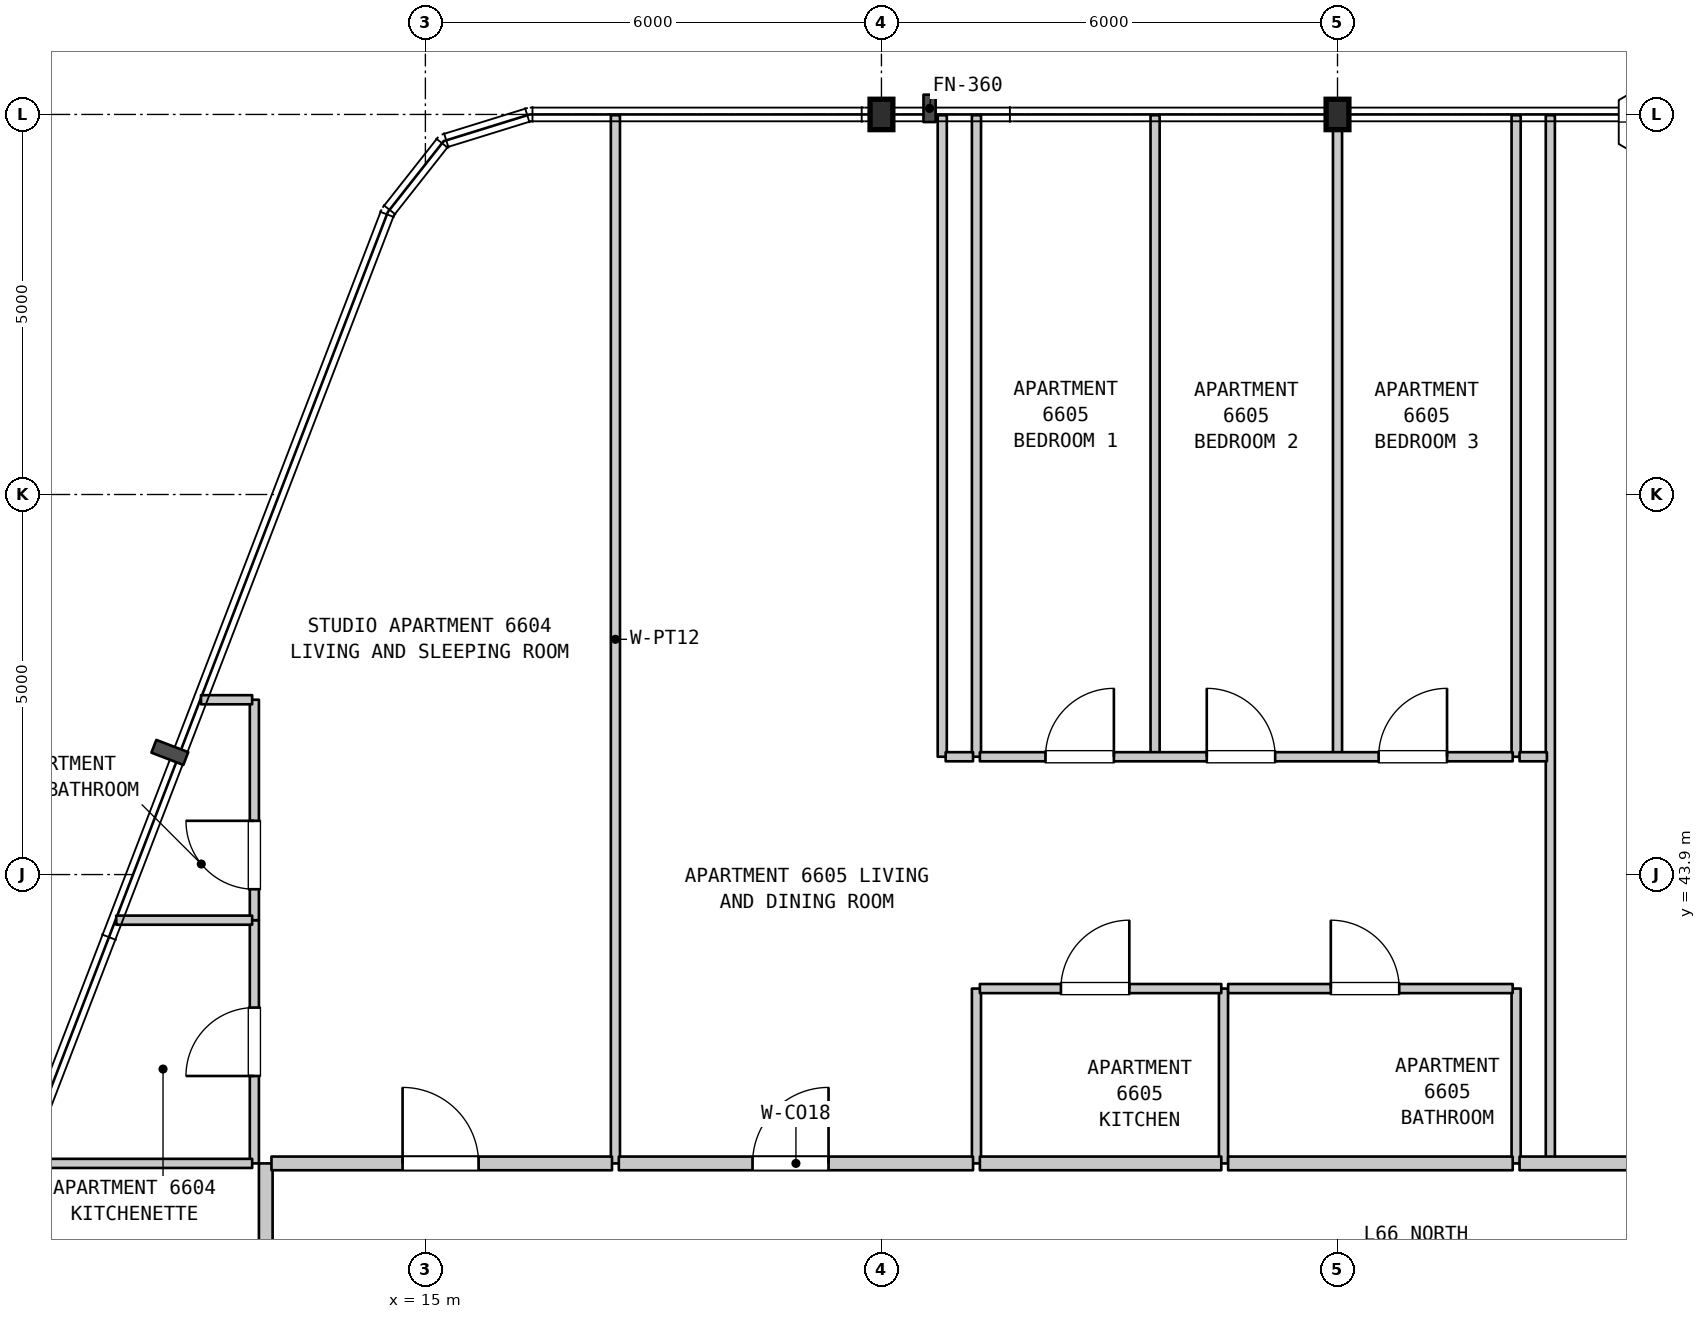
"""IFC4 building model, lengths in metres.
Left out: names, types, materials, properties, quantities, classifications, styles, units other than length and angle.
Written with IfcOpenShell. Run it as: python <this file> out.ifc"""

import sys

from ifc_helpers import new_model, si_unit, direction, frame, frame_2d, origin, origin_2d, place, context, subcontext, project, spatial, rectangle, i_section, extrude, element, fill, save


model = new_model("IFC4")
c1 = context("Model", 3, precision=1e-05, world=origin(), true_north=direction((0.0, 1.0)))
c2 = subcontext(c1, "Body", "Model", "MODEL_VIEW")
j1 = project(units=[si_unit("LENGTHUNIT", "METRE"), si_unit("PLANEANGLEUNIT", "RADIAN")], contexts=[c1])
p1 = place(None, origin())
s1 = spatial("IfcSite", under=j1, at=p1, CompositionType="ELEMENT")
p2 = place(p1, origin())
s2 = spatial("IfcBuilding", under=s1, at=p2, CompositionType="ELEMENT")
p3 = place(p2, frame((0.0, 0.0, 265.8)))
s3 = spatial("IfcBuildingStorey", under=s2, at=p3, CompositionType="ELEMENT", Elevation=265.8)
for number, where, z_axis, x_axis in (
    (1, (21.0, 53.9, 0.0), (0.0, 0.0, 1.0), (1.0, 0.0, 0.0)),
    (2, (27.0, 53.9, 0.0), (0.0, 0.0, 1.0), (1.0, 0.0, 0.0)),
):
    element("IfcColumn", number, at=place(p3, frame(where, z_axis=z_axis, x_axis=x_axis)), inside=s3, PredefinedType="COLUMN", context=c2, shape_type="SweptSolid", body=[
        extrude(i_section(OverallWidth=0.3, OverallDepth=0.4, WebThickness=0.013, FlangeThickness=0.024, FilletRadius=0.027, at=origin_2d()), origin(), (0.0, 0.0, 1.0), 3.7),
    ])
p4 = place(p3, frame((12.75, 40.1, 0.0), z_axis=(0.0, 0.0, 1.0), x_axis=(0.0, 1.0, 0.0)))
e3 = element("IfcWall", 3, at=p4, inside=s3, PredefinedType="PARTITIONING", context=c2, shape_type="SweptSolid", body=[
    extrude(rectangle(XDim=3.2, YDim=0.12, at=frame_2d((1.6, 0.0))), origin(), (0.0, 0.0, 1.0), 3.39),
])
p5 = place(p4, frame((1.15, 0.0, 0.0)))
e4 = element("IfcOpeningElement", 4, at=p5, cuts=e3, PredefinedType="OPENING", context=c2, shape_type="SweptSolid", body=[
    extrude(rectangle(XDim=0.9, YDim=2.15, at=frame_2d((0.45, 1.075))), frame((0.0, 0.07, 0.0), z_axis=(0.0, -1.0, 0.0), x_axis=(1.0, 0.0, 0.0)), (0.0, 0.0, 1.0), 0.14),
])
p6 = place(p3, frame((12.75, 43.3, 0.0), z_axis=(0.0, 0.0, 1.0), x_axis=(0.0, 1.0, 0.0)))
e5 = element("IfcWall", 5, at=p6, inside=s3, PredefinedType="PARTITIONING", context=c2, shape_type="SweptSolid", body=[
    extrude(rectangle(XDim=2.9, YDim=0.12, at=frame_2d((1.45, 0.0))), origin(), (0.0, 0.0, 1.0), 3.39),
])
p7 = place(p6, frame((0.407, 0.0, 0.0)))
e6 = element("IfcOpeningElement", 6, at=p7, cuts=e5, PredefinedType="OPENING", context=c2, shape_type="SweptSolid", body=[
    extrude(rectangle(XDim=0.9, YDim=2.1, at=frame_2d((0.45, 1.05))), frame((0.0, 0.07, 0.0), z_axis=(0.0, -1.0, 0.0), x_axis=(1.0, 0.0, 0.0)), (0.0, 0.0, 1.0), 0.14),
])
p8 = place(p3, frame((12.9, 37.222, 0.0), z_axis=(0.0, 0.0, 1.0), x_axis=(0.0, 1.0, 0.0)))
e7 = element("IfcWall", 7, at=p8, inside=s3, PredefinedType="STANDARD", context=c2, shape_type="SweptSolid", body=[
    extrude(rectangle(XDim=2.878, YDim=0.18, at=frame_2d((1.439, 0.0))), origin(), (0.0, 0.0, 1.0), 3.39),
])
p9 = place(p8, frame((0.864, 0.0, 0.0)))
e8 = element("IfcOpeningElement", 8, at=p9, cuts=e7, PredefinedType="OPENING", context=c2, shape_type="SweptSolid", body=[
    extrude(rectangle(XDim=1.0, YDim=2.15, at=frame_2d((0.5, 1.075))), frame((0.0, 0.1, 0.0), z_axis=(0.0, -1.0, 0.0), x_axis=(1.0, 0.0, 0.0)), (0.0, 0.0, 1.0), 0.2),
])
p10 = place(p3, frame((17.5, 40.1, 0.0), z_axis=(0.0, 0.0, 1.0), x_axis=(0.0, 1.0, 0.0)))
e9 = element("IfcWall", 9, at=p10, inside=s3, PredefinedType="PARTITIONING", context=c2, shape_type="SweptSolid", body=[
    extrude(rectangle(XDim=13.79, YDim=0.12, at=frame_2d((6.895, 0.0))), origin(), (0.0, 0.0, 1.0), 3.39),
])
p11 = place(p3, frame((21.8, 45.45, 0.0), z_axis=(0.0, 0.0, 1.0), x_axis=(0.0, 1.0, 0.0)))
e10 = element("IfcWall", 10, at=p11, inside=s3, PredefinedType="PARTITIONING", context=c2, shape_type="SweptSolid", body=[
    extrude(rectangle(XDim=8.44, YDim=0.12, at=frame_2d((4.22, 0.0))), origin(), (0.0, 0.0, 1.0), 3.39),
])
p12 = place(p3, frame((22.25, 40.1, 0.0), z_axis=(0.0, 0.0, 1.0), x_axis=(0.0, 1.0, 0.0)))
e11 = element("IfcWall", 11, at=p12, inside=s3, PredefinedType="PARTITIONING", context=c2, shape_type="SweptSolid", body=[
    extrude(rectangle(XDim=2.3, YDim=0.12, at=frame_2d((1.15, 0.0))), origin(), (0.0, 0.0, 1.0), 3.39),
])
for number, where, z_axis, x_axis in (
    (12, (22.25, 45.45, 0.0), (0.0, 0.0, 1.0), (0.0, 1.0, 0.0)),
    (13, (24.6, 45.45, 0.0), (0.0, 0.0, 1.0), (0.0, 1.0, 0.0)),
):
    element("IfcWall", number, at=place(p3, frame(where, z_axis=z_axis, x_axis=x_axis)), inside=s3, PredefinedType="PARTITIONING", context=c2, shape_type="SweptSolid", body=[
        extrude(rectangle(XDim=8.44, YDim=0.12, at=frame_2d((4.22, 0.0))), origin(), (0.0, 0.0, 1.0), 3.39),
    ])
p13 = place(p3, frame((25.5, 40.1, 0.0), z_axis=(0.0, 0.0, 1.0), x_axis=(0.0, 1.0, 0.0)))
e14 = element("IfcWall", 14, at=p13, inside=s3, PredefinedType="PARTITIONING", context=c2, shape_type="SweptSolid", body=[
    extrude(rectangle(XDim=2.3, YDim=0.12, at=frame_2d((1.15, 0.0))), origin(), (0.0, 0.0, 1.0), 3.39),
])
p14 = place(p3, frame((27.0, 45.45, 0.0), z_axis=(0.0, 0.0, 1.0), x_axis=(0.0, 1.0, 0.0)))
e15 = element("IfcWall", 15, at=p14, inside=s3, PredefinedType="PARTITIONING", context=c2, shape_type="SweptSolid", body=[
    extrude(rectangle(XDim=8.44, YDim=0.12, at=frame_2d((4.22, 0.0))), origin(), (0.0, 0.0, 1.0), 3.15),
])
p15 = place(p3, frame((29.35, 40.1, 0.0), z_axis=(0.0, 0.0, 1.0), x_axis=(0.0, 1.0, 0.0)))
e16 = element("IfcWall", 16, at=p15, inside=s3, PredefinedType="PARTITIONING", context=c2, shape_type="SweptSolid", body=[
    extrude(rectangle(XDim=2.3, YDim=0.12, at=frame_2d((1.15, 0.0))), origin(), (0.0, 0.0, 1.0), 3.39),
])
p16 = place(p3, frame((29.35, 45.45, 0.0), z_axis=(0.0, 0.0, 1.0), x_axis=(0.0, 1.0, 0.0)))
e17 = element("IfcWall", 17, at=p16, inside=s3, PredefinedType="PARTITIONING", context=c2, shape_type="SweptSolid", body=[
    extrude(rectangle(XDim=8.44, YDim=0.12, at=frame_2d((4.22, 0.0))), origin(), (0.0, 0.0, 1.0), 3.39),
])
p17 = place(p3, frame((29.8, 40.1, 0.0), z_axis=(0.0, 0.0, 1.0), x_axis=(0.0, 1.0, 0.0)))
e18 = element("IfcWall", 18, at=p17, inside=s3, PredefinedType="PARTITIONING", context=c2, shape_type="SweptSolid", body=[
    extrude(rectangle(XDim=13.79, YDim=0.12, at=frame_2d((6.895, 0.0))), origin(), (0.0, 0.0, 1.0), 3.39),
])
p18 = place(p3, frame((9.702, 40.1, 0.0), z_axis=(0.0, 0.0, 1.0), x_axis=(1.0, 0.0, 0.0)))
e19 = element("IfcWall", 19, at=p18, inside=s3, PredefinedType="PARTITIONING", context=c2, shape_type="SweptSolid", body=[
    extrude(rectangle(XDim=3.019, YDim=0.12, at=frame_2d((1.51, 0.0))), origin(), (0.0, 0.0, 1.0), 3.39),
])
p19 = place(p3, frame((12.975, 40.1, 0.0), z_axis=(0.0, 0.0, 1.0), x_axis=(1.0, 0.0, 0.0)))
e20 = element("IfcWall", 20, at=p19, inside=s3, PredefinedType="STANDARD", context=c2, shape_type="SweptSolid", body=[
    extrude(rectangle(XDim=4.48, YDim=0.18, at=frame_2d((2.24, 0.0))), origin(), (0.0, 0.0, 1.0), 3.39),
])
p20 = place(p19, frame((1.725, 0.0, 0.0)))
e21 = element("IfcOpeningElement", 21, at=p20, cuts=e20, PredefinedType="OPENING", context=c2, shape_type="SweptSolid", body=[
    extrude(rectangle(XDim=1.0, YDim=2.15, at=frame_2d((0.5, 1.075))), frame((0.0, 0.1, 0.0), z_axis=(0.0, -1.0, 0.0), x_axis=(1.0, 0.0, 0.0)), (0.0, 0.0, 1.0), 0.2),
])
p21 = place(p3, frame((17.545, 40.1, 0.0), z_axis=(0.0, 0.0, 1.0), x_axis=(1.0, 0.0, 0.0)))
e22 = element("IfcWall", 22, at=p21, inside=s3, PredefinedType="STANDARD", context=c2, shape_type="SweptSolid", body=[
    extrude(rectangle(XDim=4.66, YDim=0.18, at=frame_2d((2.33, 0.0))), origin(), (0.0, 0.0, 1.0), 3.39),
])
p22 = place(p21, frame((1.759, 0.0, 0.0)))
e23 = element("IfcOpeningElement", 23, at=p22, cuts=e22, PredefinedType="OPENING", context=c2, shape_type="SweptSolid", body=[
    extrude(rectangle(XDim=1.0, YDim=2.15, at=frame_2d((0.5, 1.075))), frame((0.0, 0.1, 0.0), z_axis=(0.0, -1.0, 0.0), x_axis=(1.0, 0.0, 0.0)), (0.0, 0.0, 1.0), 0.2),
])
p23 = place(p3, frame((22.295, 40.1, 0.0), z_axis=(0.0, 0.0, 1.0), x_axis=(1.0, 0.0, 0.0)))
e24 = element("IfcWall", 24, at=p23, inside=s3, PredefinedType="STANDARD", context=c2, shape_type="SweptSolid", body=[
    extrude(rectangle(XDim=3.176, YDim=0.18, at=frame_2d((1.588, 0.0))), origin(), (0.0, 0.0, 1.0), 3.39),
])
p24 = place(p3, frame((25.561, 40.1, 0.0), z_axis=(0.0, 0.0, 1.0), x_axis=(1.0, 0.0, 0.0)))
e25 = element("IfcWall", 25, at=p24, inside=s3, PredefinedType="STANDARD", context=c2, shape_type="SweptSolid", body=[
    extrude(rectangle(XDim=3.744, YDim=0.18, at=frame_2d((1.872, 0.0))), origin(), (0.0, 0.0, 1.0), 3.39),
])
p25 = place(p3, frame((29.395, 40.1, 0.0), z_axis=(0.0, 0.0, 1.0), x_axis=(1.0, 0.0, 0.0)))
e26 = element("IfcWall", 26, at=p25, inside=s3, PredefinedType="STANDARD", context=c2, shape_type="SweptSolid", body=[
    extrude(rectangle(XDim=3.53, YDim=0.18, at=frame_2d((1.765, 0.0))), origin(), (0.0, 0.0, 1.0), 3.39),
])
p26 = place(p25, frame((1.48, 0.0, 0.0)))
e27 = element("IfcOpeningElement", 27, at=p26, cuts=e26, PredefinedType="OPENING", context=c2, shape_type="SweptSolid", body=[
    extrude(rectangle(XDim=1.0, YDim=2.15, at=frame_2d((0.5, 1.075))), frame((0.0, 0.1, 0.0), z_axis=(0.0, -1.0, 0.0), x_axis=(1.0, 0.0, 0.0)), (0.0, 0.0, 1.0), 0.2),
])
p27 = place(p3, frame((22.295, 42.4, 0.0), z_axis=(0.0, 0.0, 1.0), x_axis=(1.0, 0.0, 0.0)))
e28 = element("IfcWall", 28, at=p27, inside=s3, PredefinedType="PARTITIONING", context=c2, shape_type="SweptSolid", body=[
    extrude(rectangle(XDim=3.176, YDim=0.12, at=frame_2d((1.588, 0.0))), origin(), (0.0, 0.0, 1.0), 3.39),
])
p28 = place(p27, frame((1.066, 0.0, 0.0)))
e29 = element("IfcOpeningElement", 29, at=p28, cuts=e28, PredefinedType="OPENING", context=c2, shape_type="SweptSolid", body=[
    extrude(rectangle(XDim=0.9, YDim=2.15, at=frame_2d((0.45, 1.075))), frame((0.0, 0.07, 0.0), z_axis=(0.0, -1.0, 0.0), x_axis=(1.0, 0.0, 0.0)), (0.0, 0.0, 1.0), 0.14),
])
p29 = place(p3, frame((25.561, 42.4, 0.0), z_axis=(0.0, 0.0, 1.0), x_axis=(1.0, 0.0, 0.0)))
e30 = element("IfcWall", 30, at=p29, inside=s3, PredefinedType="PARTITIONING", context=c2, shape_type="SweptSolid", body=[
    extrude(rectangle(XDim=3.744, YDim=0.12, at=frame_2d((1.872, 0.0))), origin(), (0.0, 0.0, 1.0), 3.39),
])
p30 = place(p29, frame((1.351, 0.0, 0.0)))
e31 = element("IfcOpeningElement", 31, at=p30, cuts=e30, PredefinedType="OPENING", context=c2, shape_type="SweptSolid", body=[
    extrude(rectangle(XDim=0.9, YDim=2.1, at=frame_2d((0.45, 1.05))), frame((0.0, 0.07, 0.0), z_axis=(0.0, -1.0, 0.0), x_axis=(1.0, 0.0, 0.0)), (0.0, 0.0, 1.0), 0.14),
])
p31 = place(p3, frame((10.933, 43.3, 0.0), z_axis=(0.0, 0.0, 1.0), x_axis=(1.0, 0.0, 0.0)))
e32 = element("IfcWall", 32, at=p31, inside=s3, PredefinedType="PARTITIONING", context=c2, shape_type="SweptSolid", body=[
    extrude(rectangle(XDim=1.788, YDim=0.12, at=frame_2d((0.894, 0.0))), origin(), (0.0, 0.0, 1.0), 3.39),
])
p32 = place(p3, frame((21.845, 45.45, 0.0), z_axis=(0.0, 0.0, 1.0), x_axis=(1.0, 0.0, 0.0)))
e33 = element("IfcWall", 33, at=p32, inside=s3, PredefinedType="PARTITIONING", context=c2, shape_type="SweptSolid", body=[
    extrude(rectangle(XDim=0.36, YDim=0.12, at=frame_2d((0.18, 0.0))), origin(), (0.0, 0.0, 1.0), 3.39),
])
p33 = place(p3, frame((22.295, 45.45, 0.0), z_axis=(0.0, 0.0, 1.0), x_axis=(1.0, 0.0, 0.0)))
e34 = element("IfcWall", 34, at=p33, inside=s3, PredefinedType="PARTITIONING", context=c2, shape_type="SweptSolid", body=[
    extrude(rectangle(XDim=7.01, YDim=0.12, at=frame_2d((3.505, 0.0))), origin(), (0.0, 0.0, 1.0), 3.39),
])
p34 = place(p33, frame((0.863, 0.0, 0.0)))
e35 = element("IfcOpeningElement", 35, at=p34, cuts=e34, PredefinedType="OPENING", context=c2, shape_type="SweptSolid", body=[
    extrude(rectangle(XDim=0.9, YDim=2.15, at=frame_2d((0.45, 1.075))), frame((0.0, 0.07, 0.0), z_axis=(0.0, -1.0, 0.0), x_axis=(1.0, 0.0, 0.0)), (0.0, 0.0, 1.0), 0.14),
])
p35 = place(p33, frame((2.985, 0.0, 0.0)))
e36 = element("IfcOpeningElement", 36, at=p35, cuts=e34, PredefinedType="OPENING", context=c2, shape_type="SweptSolid", body=[
    extrude(rectangle(XDim=0.9, YDim=2.15, at=frame_2d((0.45, 1.075))), frame((0.0, 0.07, 0.0), z_axis=(0.0, -1.0, 0.0), x_axis=(1.0, 0.0, 0.0)), (0.0, 0.0, 1.0), 0.14),
])
p36 = place(p33, frame((5.246, 0.0, 0.0)))
e37 = element("IfcOpeningElement", 37, at=p36, cuts=e34, PredefinedType="OPENING", context=c2, shape_type="SweptSolid", body=[
    extrude(rectangle(XDim=0.9, YDim=2.15, at=frame_2d((0.45, 1.075))), frame((0.0, 0.07, 0.0), z_axis=(0.0, -1.0, 0.0), x_axis=(1.0, 0.0, 0.0)), (0.0, 0.0, 1.0), 0.14),
])
p37 = place(p3, frame((29.395, 45.45, 0.0), z_axis=(0.0, 0.0, 1.0), x_axis=(1.0, 0.0, 0.0)))
e38 = element("IfcWall", 38, at=p37, inside=s3, PredefinedType="PARTITIONING", context=c2, shape_type="SweptSolid", body=[
    extrude(rectangle(XDim=0.36, YDim=0.12, at=frame_2d((0.18, 0.0))), origin(), (0.0, 0.0, 1.0), 3.39),
])
p38 = place(p3, frame((12.048, 46.2, 0.0), z_axis=(0.0, 0.0, 1.0), x_axis=(1.0, 0.0, 0.0)))
e39 = element("IfcWall", 39, at=p38, inside=s3, PredefinedType="PARTITIONING", context=c2, shape_type="SweptSolid", body=[
    extrude(rectangle(XDim=0.673, YDim=0.12, at=frame_2d((0.336, 0.0))), origin(), (0.0, 0.0, 1.0), 3.39),
])
p39 = place(p5, origin())
e40 = element("IfcDoor", 40, at=p39, inside=s3, OperationType="SINGLE_SWING_LEFT", PredefinedType="DOOR", context=c2, shape_type="SweptSolid", body=[
    extrude(rectangle(XDim=0.9, YDim=2.15, at=frame_2d((0.45, 1.075))), frame((0.0, 0.025, 0.0), z_axis=(0.0, -1.0, 0.0), x_axis=(1.0, 0.0, 0.0)), (0.0, 0.0, 1.0), 0.05),
])
fill(e4, e40)
p40 = place(p7, origin())
e41 = element("IfcDoor", 41, at=p40, inside=s3, OperationType="SINGLE_SWING_RIGHT", PredefinedType="DOOR", context=c2, shape_type="SweptSolid", body=[
    extrude(rectangle(XDim=0.9, YDim=2.1, at=frame_2d((0.45, 1.05))), frame((0.0, 0.025, 0.0), z_axis=(0.0, -1.0, 0.0), x_axis=(1.0, 0.0, 0.0)), (0.0, 0.0, 1.0), 0.05),
])
fill(e6, e41)
p41 = place(p20, origin())
e42 = element("IfcDoor", 42, at=p41, inside=s3, OperationType="SINGLE_SWING_LEFT", PredefinedType="DOOR", context=c2, shape_type="SweptSolid", body=[
    extrude(rectangle(XDim=1.0, YDim=2.15, at=frame_2d((0.5, 1.075))), frame((0.0, 0.025, 0.0), z_axis=(0.0, -1.0, 0.0), x_axis=(1.0, 0.0, 0.0)), (0.0, 0.0, 1.0), 0.05),
])
fill(e21, e42)
p42 = place(p22, origin())
e43 = element("IfcDoor", 43, at=p42, inside=s3, OperationType="SINGLE_SWING_RIGHT", PredefinedType="DOOR", context=c2, shape_type="SweptSolid", body=[
    extrude(rectangle(XDim=1.0, YDim=2.15, at=frame_2d((0.5, 1.075))), frame((0.0, 0.025, 0.0), z_axis=(0.0, -1.0, 0.0), x_axis=(1.0, 0.0, 0.0)), (0.0, 0.0, 1.0), 0.05),
])
fill(e23, e43)
p43 = place(p28, origin())
e44 = element("IfcDoor", 44, at=p43, inside=s3, OperationType="SINGLE_SWING_RIGHT", PredefinedType="DOOR", context=c2, shape_type="SweptSolid", body=[
    extrude(rectangle(XDim=0.9, YDim=2.15, at=frame_2d((0.45, 1.075))), frame((0.0, 0.025, 0.0), z_axis=(0.0, -1.0, 0.0), x_axis=(1.0, 0.0, 0.0)), (0.0, 0.0, 1.0), 0.05),
])
fill(e29, e44)
p44 = place(p30, origin())
e45 = element("IfcDoor", 45, at=p44, inside=s3, OperationType="SINGLE_SWING_LEFT", PredefinedType="DOOR", context=c2, shape_type="SweptSolid", body=[
    extrude(rectangle(XDim=0.9, YDim=2.1, at=frame_2d((0.45, 1.05))), frame((0.0, 0.025, 0.0), z_axis=(0.0, -1.0, 0.0), x_axis=(1.0, 0.0, 0.0)), (0.0, 0.0, 1.0), 0.05),
])
fill(e31, e45)
p45 = place(p34, origin())
e46 = element("IfcDoor", 46, at=p45, inside=s3, OperationType="SINGLE_SWING_RIGHT", PredefinedType="DOOR", context=c2, shape_type="SweptSolid", body=[
    extrude(rectangle(XDim=0.9, YDim=2.15, at=frame_2d((0.45, 1.075))), frame((0.0, 0.025, 0.0), z_axis=(0.0, -1.0, 0.0), x_axis=(1.0, 0.0, 0.0)), (0.0, 0.0, 1.0), 0.05),
])
fill(e35, e46)
p46 = place(p35, origin())
e47 = element("IfcDoor", 47, at=p46, inside=s3, OperationType="SINGLE_SWING_LEFT", PredefinedType="DOOR", context=c2, shape_type="SweptSolid", body=[
    extrude(rectangle(XDim=0.9, YDim=2.15, at=frame_2d((0.45, 1.075))), frame((0.0, 0.025, 0.0), z_axis=(0.0, -1.0, 0.0), x_axis=(1.0, 0.0, 0.0)), (0.0, 0.0, 1.0), 0.05),
])
fill(e36, e47)
p47 = place(p36, origin())
e48 = element("IfcDoor", 48, at=p47, inside=s3, OperationType="SINGLE_SWING_RIGHT", PredefinedType="DOOR", context=c2, shape_type="SweptSolid", body=[
    extrude(rectangle(XDim=0.9, YDim=2.15, at=frame_2d((0.45, 1.075))), frame((0.0, 0.025, 0.0), z_axis=(0.0, -1.0, 0.0), x_axis=(1.0, 0.0, 0.0)), (0.0, 0.0, 1.0), 0.05),
])
fill(e37, e48)
save(model, sys.argv[1])
